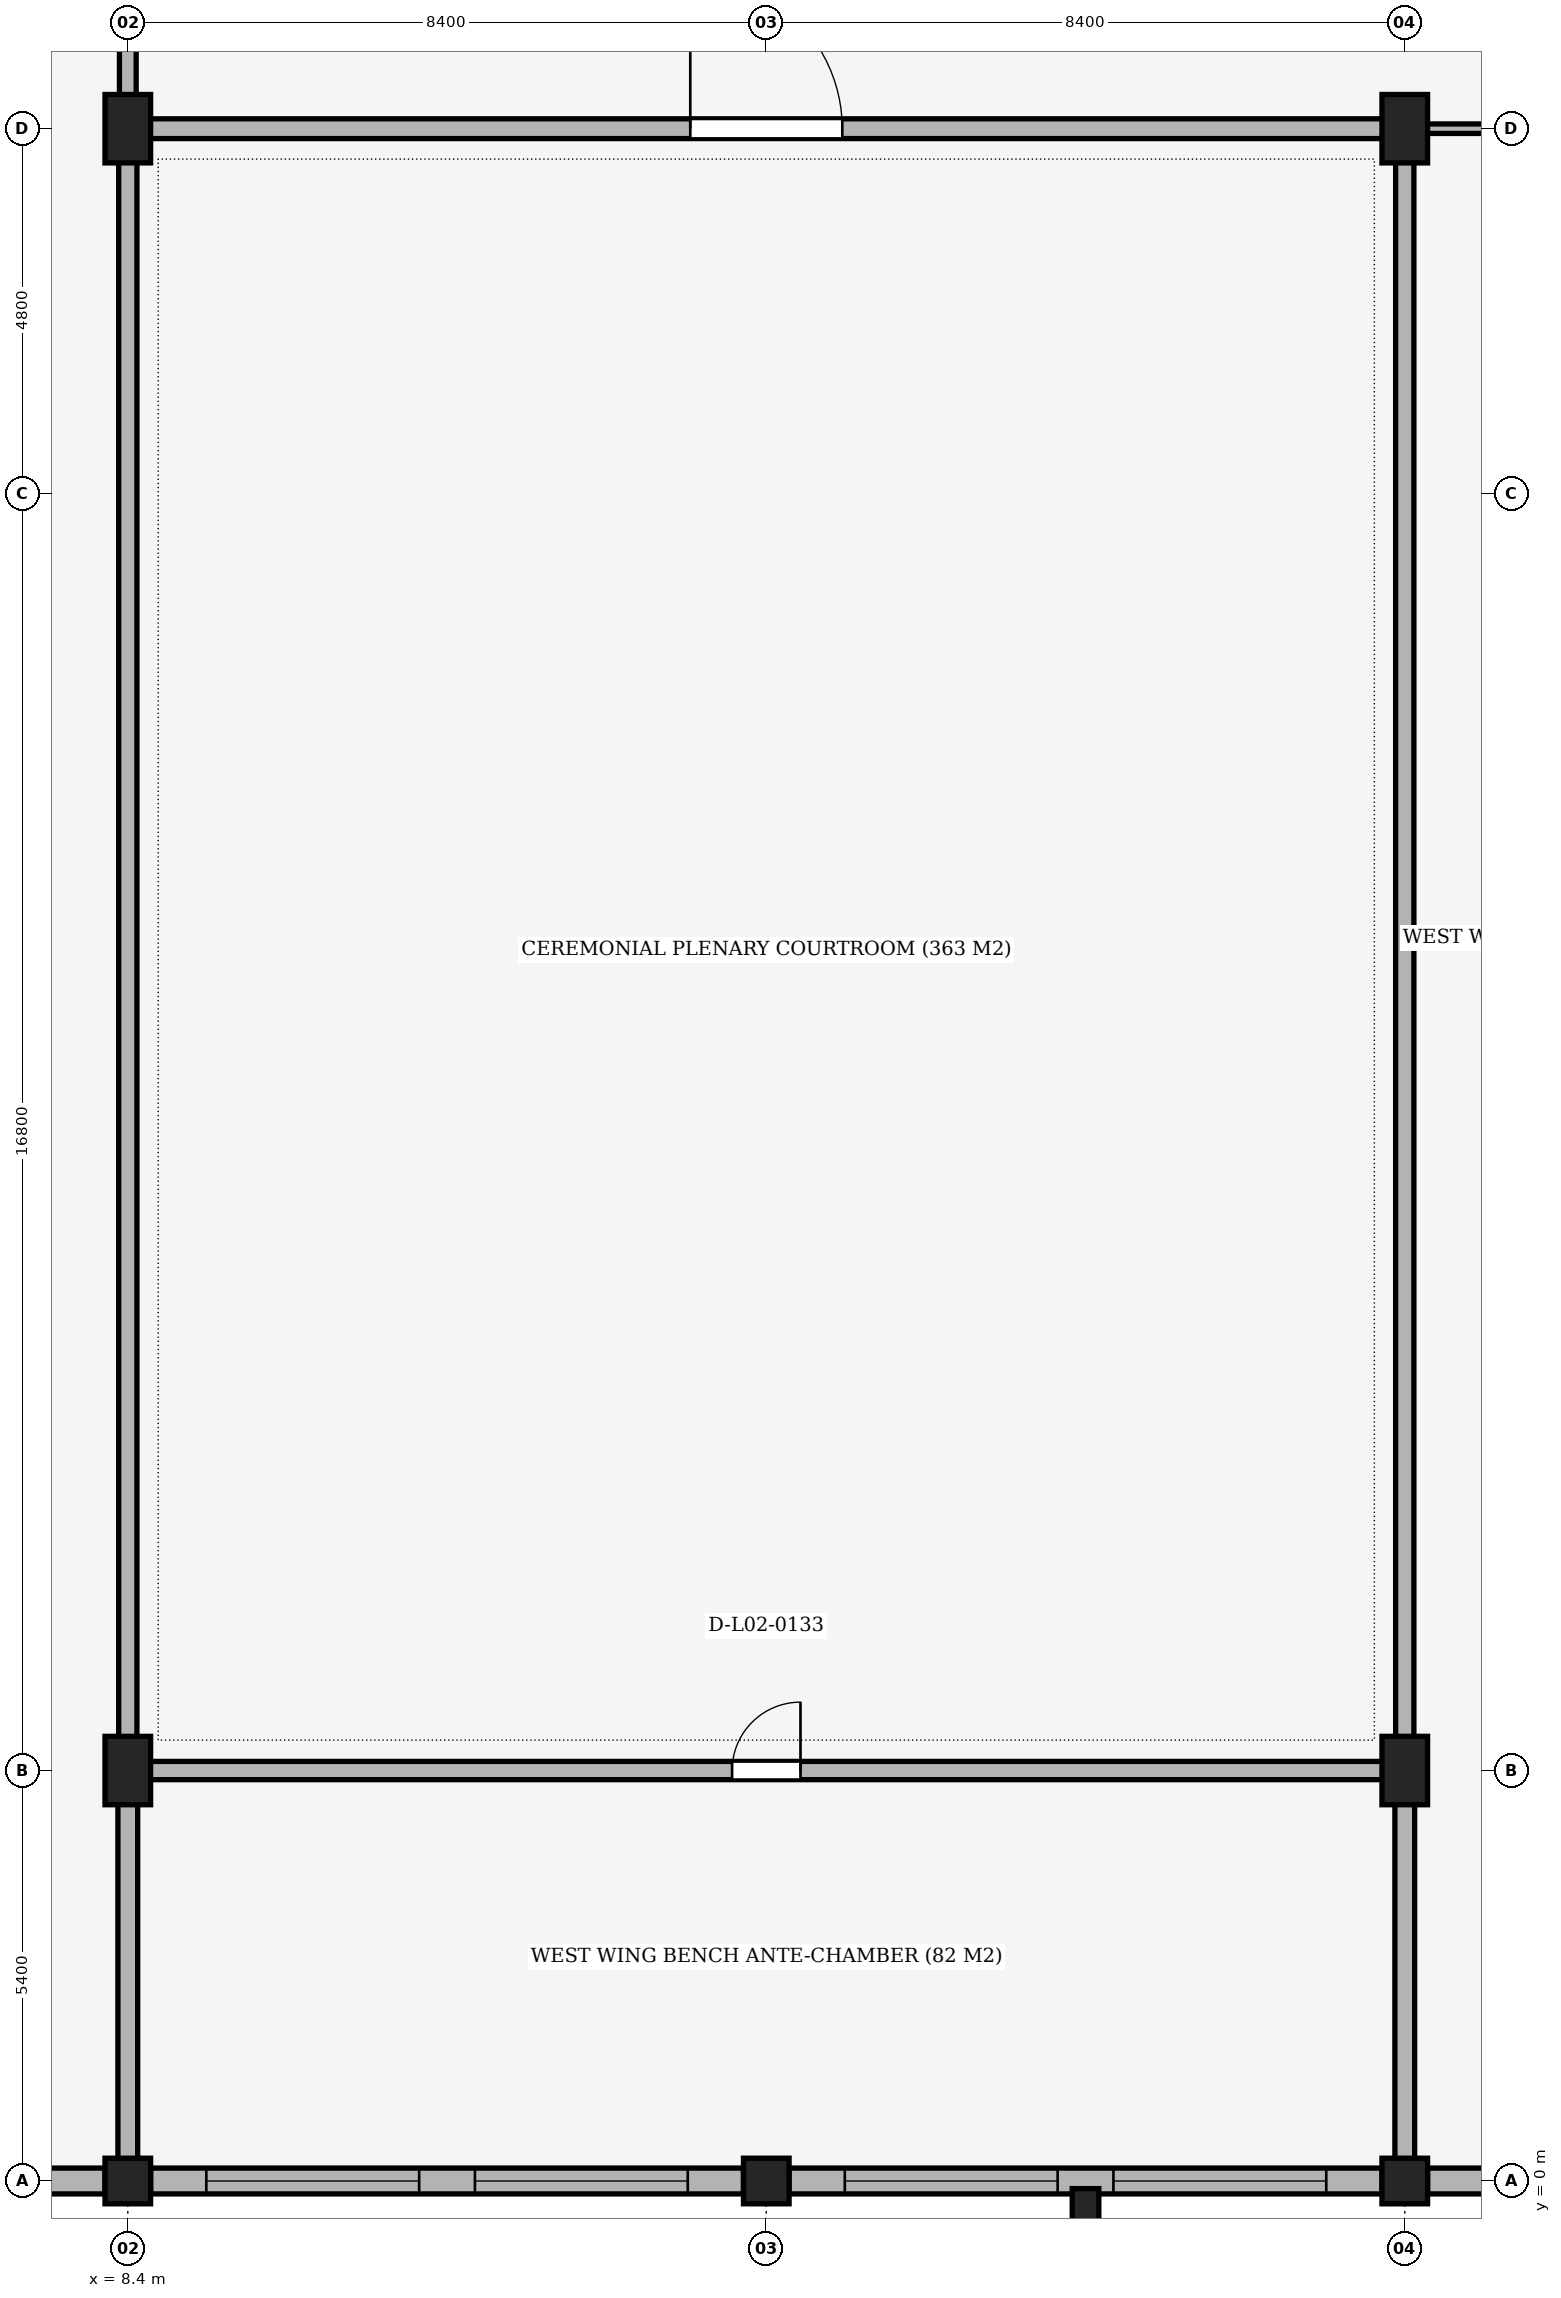
"""IFC4 building model, lengths in metres.
Left out: names, types, materials, properties, quantities, classifications, styles, units other than length and angle.
Written with IfcOpenShell. Run it as: python <this file> out.ifc"""

import sys

from ifc_helpers import new_model, si_unit, direction, frame, frame_2d, origin, origin_2d, place, context, subcontext, project, spatial, rectangle, extrude, element, fill, save


model = new_model("IFC4")
c1 = context("Model", 3, precision=1e-05, world=origin(), true_north=direction((0.0, 1.0)))
c2 = subcontext(c1, "Body", "Model", "MODEL_VIEW")
j1 = project(units=[si_unit("LENGTHUNIT", "METRE"), si_unit("PLANEANGLEUNIT", "RADIAN")], contexts=[c1])
p1 = place(None, origin())
s1 = spatial("IfcSite", under=j1, at=p1, CompositionType="ELEMENT")
p2 = place(p1, origin())
s2 = spatial("IfcBuilding", under=s1, at=p2, CompositionType="ELEMENT")
p3 = place(p2, frame((0.0, 0.0, 10.2)))
s3 = spatial("IfcBuildingStorey", under=s2, at=p3, CompositionType="ELEMENT", Elevation=10.2)
p4 = place(p3, frame((8.4, 0.0, 0.0), z_axis=(0.0, 0.0, 1.0), x_axis=(1.0, 0.0, 0.0)))
e1 = element("IfcColumn", 1, at=p4, inside=s3, PredefinedType="COLUMN", context=c2, shape_type="SweptSolid", body=[
    extrude(rectangle(XDim=0.6, YDim=0.6, at=origin_2d()), origin(), (0.0, 0.0, 1.0), 5.1),
])
for number, where, z_axis, x_axis in (
    (2, (8.4, 5.4, 0.0), (0.0, 0.0, 1.0), (1.0, 0.0, 0.0)),
    (3, (8.4, 27.0, 0.0), (0.0, 0.0, 1.0), (1.0, 0.0, 0.0)),
):
    element("IfcColumn", number, at=place(p3, frame(where, z_axis=z_axis, x_axis=x_axis)), inside=s3, PredefinedType="COLUMN", context=c2, shape_type="SweptSolid", body=[
        extrude(rectangle(XDim=0.6, YDim=0.9, at=origin_2d()), origin(), (0.0, 0.0, 1.0), 5.1),
    ])
for number, where, z_axis, x_axis in (
    (4, (16.8, 0.0, 0.0), (0.0, 0.0, 1.0), (1.0, 0.0, 0.0)),
    (5, (25.2, 0.0, 0.0), (0.0, 0.0, 1.0), (1.0, 0.0, 0.0)),
):
    element("IfcColumn", number, at=place(p3, frame(where, z_axis=z_axis, x_axis=x_axis)), inside=s3, PredefinedType="COLUMN", context=c2, shape_type="SweptSolid", body=[
        extrude(rectangle(XDim=0.6, YDim=0.6, at=origin_2d()), origin(), (0.0, 0.0, 1.0), 5.1),
    ])
for number, where, z_axis, x_axis in (
    (6, (25.2, 5.4, 0.0), (0.0, 0.0, 1.0), (1.0, 0.0, 0.0)),
    (7, (25.2, 27.0, 0.0), (0.0, 0.0, 1.0), (1.0, 0.0, 0.0)),
):
    element("IfcColumn", number, at=place(p3, frame(where, z_axis=z_axis, x_axis=x_axis)), inside=s3, PredefinedType="COLUMN", context=c2, shape_type="SweptSolid", body=[
        extrude(rectangle(XDim=0.6, YDim=0.9, at=origin_2d()), origin(), (0.0, 0.0, 1.0), 5.1),
    ])
p5 = place(p3, frame((21.0, -0.35, 0.0), z_axis=(0.0, 0.0, 1.0), x_axis=(1.0, 0.0, 0.0)))
e8 = element("IfcColumn", 8, at=p5, inside=s3, PredefinedType="PILASTER", context=c2, shape_type="SweptSolid", body=[
    extrude(rectangle(XDim=0.35, YDim=0.5, at=origin_2d()), origin(), (0.0, 0.0, 1.0), 5.1),
])
p6 = place(p3, frame((33.3, 0.0, 0.0), z_axis=(0.0, 0.0, 1.0), x_axis=(-1.0, 0.0, 0.0)))
e9 = element("IfcWall", 9, at=p6, inside=s3, PredefinedType="SOLIDWALL", context=c2, shape_type="SweptSolid", body=[
    extrude(rectangle(XDim=7.8, YDim=0.34, at=frame_2d((3.9, 0.0))), origin(), (0.0, 0.0, 1.0), 4.12),
])
p7 = place(p6, frame((4.267, 0.0, 0.75)))
e10 = element("IfcOpeningElement", 10, at=p7, cuts=e9, PredefinedType="OPENING", context=c2, shape_type="SweptSolid", body=[
    extrude(rectangle(XDim=2.8, YDim=2.6, at=frame_2d((1.4, 1.3))), frame((0.0, 0.185, 0.0), z_axis=(0.0, -1.0, 0.0), x_axis=(1.0, 0.0, 0.0)), (0.0, 0.0, 1.0), 0.37),
])
p8 = place(p3, frame((24.9, 0.0, 0.0), z_axis=(0.0, 0.0, 1.0), x_axis=(-1.0, 0.0, 0.0)))
e11 = element("IfcWall", 11, at=p8, inside=s3, PredefinedType="SOLIDWALL", context=c2, shape_type="SweptSolid", body=[
    extrude(rectangle(XDim=7.8, YDim=0.34, at=frame_2d((3.9, 0.0))), origin(), (0.0, 0.0, 1.0), 4.12),
])
p9 = place(p8, frame((0.733, 0.0, 0.75)))
e12 = element("IfcOpeningElement", 12, at=p9, cuts=e11, PredefinedType="OPENING", context=c2, shape_type="SweptSolid", body=[
    extrude(rectangle(XDim=2.8, YDim=2.6, at=frame_2d((1.4, 1.3))), frame((0.0, 0.185, 0.0), z_axis=(0.0, -1.0, 0.0), x_axis=(1.0, 0.0, 0.0)), (0.0, 0.0, 1.0), 0.37),
])
p10 = place(p8, frame((4.267, 0.0, 0.75)))
e13 = element("IfcOpeningElement", 13, at=p10, cuts=e11, PredefinedType="OPENING", context=c2, shape_type="SweptSolid", body=[
    extrude(rectangle(XDim=2.8, YDim=2.6, at=frame_2d((1.4, 1.3))), frame((0.0, 0.185, 0.0), z_axis=(0.0, -1.0, 0.0), x_axis=(1.0, 0.0, 0.0)), (0.0, 0.0, 1.0), 0.37),
])
p11 = place(p3, frame((16.5, 0.0, 0.0), z_axis=(0.0, 0.0, 1.0), x_axis=(-1.0, 0.0, 0.0)))
e14 = element("IfcWall", 14, at=p11, inside=s3, PredefinedType="SOLIDWALL", context=c2, shape_type="SweptSolid", body=[
    extrude(rectangle(XDim=7.8, YDim=0.34, at=frame_2d((3.9, 0.0))), origin(), (0.0, 0.0, 1.0), 4.12),
])
p12 = place(p11, frame((0.733, 0.0, 0.75)))
e15 = element("IfcOpeningElement", 15, at=p12, cuts=e14, PredefinedType="OPENING", context=c2, shape_type="SweptSolid", body=[
    extrude(rectangle(XDim=2.8, YDim=2.6, at=frame_2d((1.4, 1.3))), frame((0.0, 0.185, 0.0), z_axis=(0.0, -1.0, 0.0), x_axis=(1.0, 0.0, 0.0)), (0.0, 0.0, 1.0), 0.37),
])
p13 = place(p11, frame((4.267, 0.0, 0.75)))
e16 = element("IfcOpeningElement", 16, at=p13, cuts=e14, PredefinedType="OPENING", context=c2, shape_type="SweptSolid", body=[
    extrude(rectangle(XDim=2.8, YDim=2.6, at=frame_2d((1.4, 1.3))), frame((0.0, 0.185, 0.0), z_axis=(0.0, -1.0, 0.0), x_axis=(1.0, 0.0, 0.0)), (0.0, 0.0, 1.0), 0.37),
])
p14 = place(p3, frame((8.1, 0.0, 0.0), z_axis=(0.0, 0.0, 1.0), x_axis=(-1.0, 0.0, 0.0)))
e17 = element("IfcWall", 17, at=p14, inside=s3, PredefinedType="SOLIDWALL", context=c2, shape_type="SweptSolid", body=[
    extrude(rectangle(XDim=7.8, YDim=0.34, at=frame_2d((3.9, 0.0))), origin(), (0.0, 0.0, 1.0), 4.12),
])
p15 = place(p14, frame((0.733, 0.0, 0.75)))
e18 = element("IfcOpeningElement", 18, at=p15, cuts=e17, PredefinedType="OPENING", context=c2, shape_type="SweptSolid", body=[
    extrude(rectangle(XDim=2.8, YDim=2.6, at=frame_2d((1.4, 1.3))), frame((0.0, 0.185, 0.0), z_axis=(0.0, -1.0, 0.0), x_axis=(1.0, 0.0, 0.0)), (0.0, 0.0, 1.0), 0.37),
])
p16 = place(p14, frame((4.267, 0.0, 0.75)))
e19 = element("IfcOpeningElement", 19, at=p16, cuts=e17, PredefinedType="OPENING", context=c2, shape_type="SweptSolid", body=[
    extrude(rectangle(XDim=2.8, YDim=2.6, at=frame_2d((1.4, 1.3))), frame((0.0, 0.185, 0.0), z_axis=(0.0, -1.0, 0.0), x_axis=(1.0, 0.0, 0.0)), (0.0, 0.0, 1.0), 0.37),
])
p17 = place(p3, frame((8.4, 5.4, 0.0), z_axis=(0.0, 0.0, 1.0), x_axis=(1.0, 0.0, 0.0)))
e20 = element("IfcWall", 20, at=p17, inside=s3, PredefinedType="PARTITIONING", context=c2, shape_type="SweptSolid", body=[
    extrude(rectangle(XDim=16.8, YDim=0.24, at=frame_2d((8.4, 0.0))), origin(), (0.0, 0.0, 1.0), 3.57),
])
p18 = place(p17, frame((7.95, 0.0, 0.0)))
e21 = element("IfcOpeningElement", 21, at=p18, cuts=e20, PredefinedType="OPENING", context=c2, shape_type="SweptSolid", body=[
    extrude(rectangle(XDim=0.9, YDim=2.1, at=frame_2d((0.45, 1.05))), frame((0.0, 0.135, 0.0), z_axis=(0.0, -1.0, 0.0), x_axis=(1.0, 0.0, 0.0)), (0.0, 0.0, 1.0), 0.27),
])
p19 = place(p3, frame((8.4, 27.0, 0.0), z_axis=(0.0, 0.0, 1.0), x_axis=(1.0, 0.0, 0.0)))
e22 = element("IfcWall", 22, at=p19, inside=s3, PredefinedType="PARTITIONING", context=c2, shape_type="SweptSolid", body=[
    extrude(rectangle(XDim=16.8, YDim=0.26, at=frame_2d((8.4, 0.0))), origin(), (0.0, 0.0, 1.0), 3.57),
])
p20 = place(p19, frame((7.4, 0.0, 0.0)))
e23 = element("IfcOpeningElement", 23, at=p20, cuts=e22, PredefinedType="OPENING", context=c2, shape_type="SweptSolid", body=[
    extrude(rectangle(XDim=2.0, YDim=2.5, at=frame_2d((1.0, 1.25))), frame((0.0, 0.145, 0.0), z_axis=(0.0, -1.0, 0.0), x_axis=(1.0, 0.0, 0.0)), (0.0, 0.0, 1.0), 0.29),
])
p21 = place(p3, frame((25.2, 27.0, 0.0), z_axis=(0.0, 0.0, 1.0), x_axis=(1.0, 0.0, 0.0)))
e24 = element("IfcWall", 24, at=p21, inside=s3, PredefinedType="PARTITIONING", context=c2, shape_type="SweptSolid", body=[
    extrude(rectangle(XDim=5.0, YDim=0.125, at=frame_2d((2.5, 0.0))), origin(), (0.0, 0.0, 1.0), 3.57),
])
p22 = place(p3, frame((8.4, -0.064, 0.0), z_axis=(0.0, 0.0, 1.0), x_axis=(0.0, 1.0, 0.0)))
e25 = element("IfcWall", 25, at=p22, inside=s3, PredefinedType="PARTITIONING", context=c2, shape_type="SweptSolid", body=[
    extrude(rectangle(XDim=5.342, YDim=0.26, at=frame_2d((2.671, 0.0))), origin(), (0.0, 0.0, 1.0), 3.67),
])
p23 = place(p3, frame((8.4, 5.522, 0.0), z_axis=(0.0, 0.0, 1.0), x_axis=(0.0, 1.0, 0.0)))
e26 = element("IfcWall", 26, at=p23, inside=s3, PredefinedType="PARTITIONING", context=c2, shape_type="SweptSolid", body=[
    extrude(rectangle(XDim=21.346, YDim=0.24, at=frame_2d((10.673, 0.0))), origin(), (0.0, 0.0, 1.0), 3.57),
])
p24 = place(p3, frame((8.4, 27.132, 0.0), z_axis=(0.0, 0.0, 1.0), x_axis=(0.0, 1.0, 0.0)))
e27 = element("IfcWall", 27, at=p24, inside=s3, PredefinedType="PARTITIONING", context=c2, shape_type="SweptSolid", body=[
    extrude(rectangle(XDim=3.156, YDim=0.22, at=frame_2d((1.578, 0.0))), origin(), (0.0, 0.0, 1.0), 3.67),
])
p25 = place(p24, frame((1.078, 0.0, 0.0)))
e28 = element("IfcOpeningElement", 28, at=p25, cuts=e27, PredefinedType="OPENING", context=c2, shape_type="SweptSolid", body=[
    extrude(rectangle(XDim=1.0, YDim=2.1, at=frame_2d((0.5, 1.05))), frame((0.0, 0.125, 0.0), z_axis=(0.0, -1.0, 0.0), x_axis=(1.0, 0.0, 0.0)), (0.0, 0.0, 1.0), 0.25),
])
p26 = place(p3, frame((25.2, -0.064, 0.0), z_axis=(0.0, 0.0, 1.0), x_axis=(0.0, 1.0, 0.0)))
e29 = element("IfcWall", 29, at=p26, inside=s3, PredefinedType="PARTITIONING", context=c2, shape_type="SweptSolid", body=[
    extrude(rectangle(XDim=5.342, YDim=0.26, at=frame_2d((2.671, 0.0))), origin(), (0.0, 0.0, 1.0), 3.67),
])
p27 = place(p3, frame((25.2, 5.522, 0.0), z_axis=(0.0, 0.0, 1.0), x_axis=(0.0, 1.0, 0.0)))
e30 = element("IfcWall", 30, at=p27, inside=s3, PredefinedType="PARTITIONING", context=c2, shape_type="SweptSolid", body=[
    extrude(rectangle(XDim=21.346, YDim=0.24, at=frame_2d((10.673, 0.0))), origin(), (0.0, 0.0, 1.0), 3.57),
])
p28 = place(p9, origin())
e31 = element("IfcWindow", 31, at=p28, inside=s3, PartitioningType="SINGLE_PANEL", PredefinedType="WINDOW", context=c2, shape_type="SweptSolid", body=[
    extrude(rectangle(XDim=2.8, YDim=2.6, at=frame_2d((1.4, 1.3))), frame((0.0, 0.03, 0.0), z_axis=(0.0, -1.0, 0.0), x_axis=(1.0, 0.0, 0.0)), (0.0, 0.0, 1.0), 0.06),
])
fill(e12, e31)
p29 = place(p10, origin())
e32 = element("IfcWindow", 32, at=p29, inside=s3, PartitioningType="SINGLE_PANEL", PredefinedType="WINDOW", context=c2, shape_type="SweptSolid", body=[
    extrude(rectangle(XDim=2.8, YDim=2.6, at=frame_2d((1.4, 1.3))), frame((0.0, 0.03, 0.0), z_axis=(0.0, -1.0, 0.0), x_axis=(1.0, 0.0, 0.0)), (0.0, 0.0, 1.0), 0.06),
])
fill(e13, e32)
p30 = place(p12, origin())
e33 = element("IfcWindow", 33, at=p30, inside=s3, PartitioningType="SINGLE_PANEL", PredefinedType="WINDOW", context=c2, shape_type="SweptSolid", body=[
    extrude(rectangle(XDim=2.8, YDim=2.6, at=frame_2d((1.4, 1.3))), frame((0.0, 0.03, 0.0), z_axis=(0.0, -1.0, 0.0), x_axis=(1.0, 0.0, 0.0)), (0.0, 0.0, 1.0), 0.06),
])
fill(e15, e33)
p31 = place(p13, origin())
e34 = element("IfcWindow", 34, at=p31, inside=s3, PartitioningType="SINGLE_PANEL", PredefinedType="WINDOW", context=c2, shape_type="SweptSolid", body=[
    extrude(rectangle(XDim=2.8, YDim=2.6, at=frame_2d((1.4, 1.3))), frame((0.0, 0.03, 0.0), z_axis=(0.0, -1.0, 0.0), x_axis=(1.0, 0.0, 0.0)), (0.0, 0.0, 1.0), 0.06),
])
fill(e16, e34)
p32 = place(p18, origin())
e35 = element("IfcDoor", 35, at=p32, inside=s3, OperationType="SINGLE_SWING_RIGHT", PredefinedType="DOOR", context=c2, shape_type="SweptSolid", body=[
    extrude(rectangle(XDim=0.9, YDim=2.1, at=frame_2d((0.45, 1.05))), frame((0.0, 0.025, 0.0), z_axis=(0.0, -1.0, 0.0), x_axis=(1.0, 0.0, 0.0)), (0.0, 0.0, 1.0), 0.05),
])
fill(e21, e35)
p33 = place(p20, origin())
e36 = element("IfcDoor", 36, at=p33, inside=s3, OperationType="SINGLE_SWING_LEFT", PredefinedType="DOOR", context=c2, shape_type="SweptSolid", body=[
    extrude(rectangle(XDim=2.0, YDim=2.5, at=frame_2d((1.0, 1.25))), frame((0.0, 0.025, 0.0), z_axis=(0.0, -1.0, 0.0), x_axis=(1.0, 0.0, 0.0)), (0.0, 0.0, 1.0), 0.05),
])
fill(e23, e36)
save(model, sys.argv[1])
